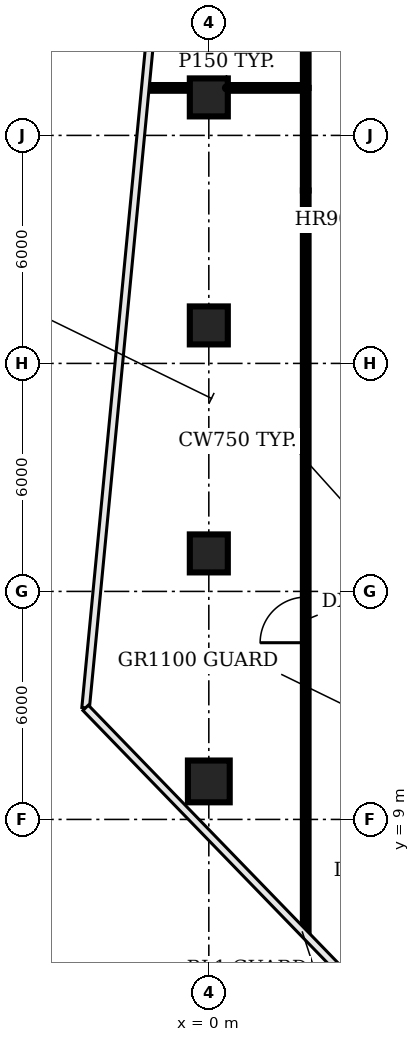
"""IFC4 building model, lengths in metres.
Left out: names, types, materials, properties, quantities, classifications, styles, units other than length and angle.
Written with IfcOpenShell. Run it as: python <this file> out.ifc"""

import sys

from ifc_helpers import new_model, si_unit, direction, frame, frame_2d, origin, origin_2d, place, context, subcontext, project, spatial, rectangle, circle, extrude, element, fill, save


model = new_model("IFC4")
c1 = context("Model", 3, precision=1e-05, world=origin(), true_north=direction((0.0, 1.0)))
c2 = subcontext(c1, "Body", "Model", "MODEL_VIEW")
j1 = project(units=[si_unit("LENGTHUNIT", "METRE"), si_unit("PLANEANGLEUNIT", "RADIAN")], contexts=[c1])
p1 = place(None, origin())
s1 = spatial("IfcSite", under=j1, at=p1, CompositionType="ELEMENT")
p2 = place(p1, origin())
s2 = spatial("IfcBuilding", under=s1, at=p2, CompositionType="ELEMENT")
p3 = place(p2, frame((0.0, 0.0, 134.0)))
s3 = spatial("IfcBuildingStorey", under=s2, at=p3, CompositionType="ELEMENT", Elevation=134.0)
p4 = place(p3, frame((0.0, 10.0, 0.0), z_axis=(0.0, 0.0, 1.0), x_axis=(1.0, 0.0, 0.0)))
e1 = element("IfcColumn", 1, at=p4, inside=s3, PredefinedType="COLUMN", context=c2, shape_type="SweptSolid", body=[
    extrude(circle(Radius=0.55, at=origin_2d()), origin(), (0.0, 0.0, 1.0), 3.2),
])
for number, where, z_axis, x_axis in (
    (2, (0.0, 16.0, 0.0), (0.0, 0.0, 1.0), (1.0, 0.0, 0.0)),
    (3, (0.0, 22.0, 0.0), (0.0, 0.0, 1.0), (1.0, 0.0, 0.0)),
    (4, (0.0, 28.0, 0.0), (0.0, 0.0, 1.0), (1.0, 0.0, 0.0)),
):
    element("IfcColumn", number, at=place(p3, frame(where, z_axis=z_axis, x_axis=x_axis)), inside=s3, PredefinedType="COLUMN", context=c2, shape_type="SweptSolid", body=[
        extrude(rectangle(XDim=1.0, YDim=1.0, at=origin_2d()), origin(), (0.0, 0.0, 1.0), 3.2),
    ])
p5 = place(p3, frame((-1.62, 28.25, 0.0), z_axis=(0.0, 0.0, 1.0), x_axis=(1.0, 0.0, 0.0)))
e5 = element("IfcWall", 5, at=p5, inside=s3, PredefinedType="PARTITIONING", context=c2, shape_type="SweptSolid", body=[
    extrude(rectangle(XDim=4.17, YDim=0.15, at=frame_2d((2.085, 0.0))), origin(), (0.0, 0.0, 1.0), 2.78),
])
p6 = place(p3, frame((2.55, 6.03, 0.0), z_axis=(0.0, 0.0, 1.0), x_axis=(0.0, 1.0, 0.0)))
e6 = element("IfcWall", 6, at=p6, inside=s3, PredefinedType="PARTITIONING", context=c2, shape_type="SweptSolid", body=[
    extrude(rectangle(XDim=19.52, YDim=0.15, at=frame_2d((9.76, 0.0))), origin(), (0.0, 0.0, 1.0), 2.78),
])
p7 = place(p6, frame((7.62, 0.0, 0.0)))
e7 = element("IfcOpeningElement", 7, at=p7, cuts=e6, PredefinedType="OPENING", context=c2, shape_type="SweptSolid", body=[
    extrude(rectangle(XDim=1.2, YDim=2.1, at=frame_2d((0.6, 1.05))), frame((0.0, 0.085, 0.0), z_axis=(0.0, -1.0, 0.0), x_axis=(1.0, 0.0, 0.0)), (0.0, 0.0, 1.0), 0.17),
])
p8 = place(p3, frame((2.55, 25.55, 0.0), z_axis=(0.0, 0.0, 1.0), x_axis=(0.0, 1.0, 0.0)))
e8 = element("IfcWall", 8, at=p8, inside=s3, PredefinedType="PARTITIONING", context=c2, shape_type="SweptSolid", body=[
    extrude(rectangle(XDim=2.7, YDim=0.15, at=frame_2d((1.35, 0.0))), origin(), (0.0, 0.0, 1.0), 2.78),
])
p9 = place(p3, frame((2.55, 28.25, 0.0), z_axis=(0.0, 0.0, 1.0), x_axis=(0.0, 1.0, 0.0)))
e9 = element("IfcWall", 9, at=p9, inside=s3, PredefinedType="PARTITIONING", context=c2, shape_type="SweptSolid", body=[
    extrude(rectangle(XDim=1.2, YDim=0.15, at=frame_2d((0.6, 0.0))), origin(), (0.0, 0.0, 1.0), 2.78),
])
p10 = place(p7, origin())
e10 = element("IfcDoor", 10, at=p10, inside=s3, OperationType="SINGLE_SWING_LEFT", PredefinedType="DOOR", context=c2, shape_type="SweptSolid", body=[
    extrude(rectangle(XDim=1.2, YDim=2.1, at=frame_2d((0.6, 1.05))), frame((0.0, 0.025, 0.0), z_axis=(0.0, -1.0, 0.0), x_axis=(1.0, 0.0, 0.0)), (0.0, 0.0, 1.0), 0.05),
])
fill(e7, e10)
save(model, sys.argv[1])
